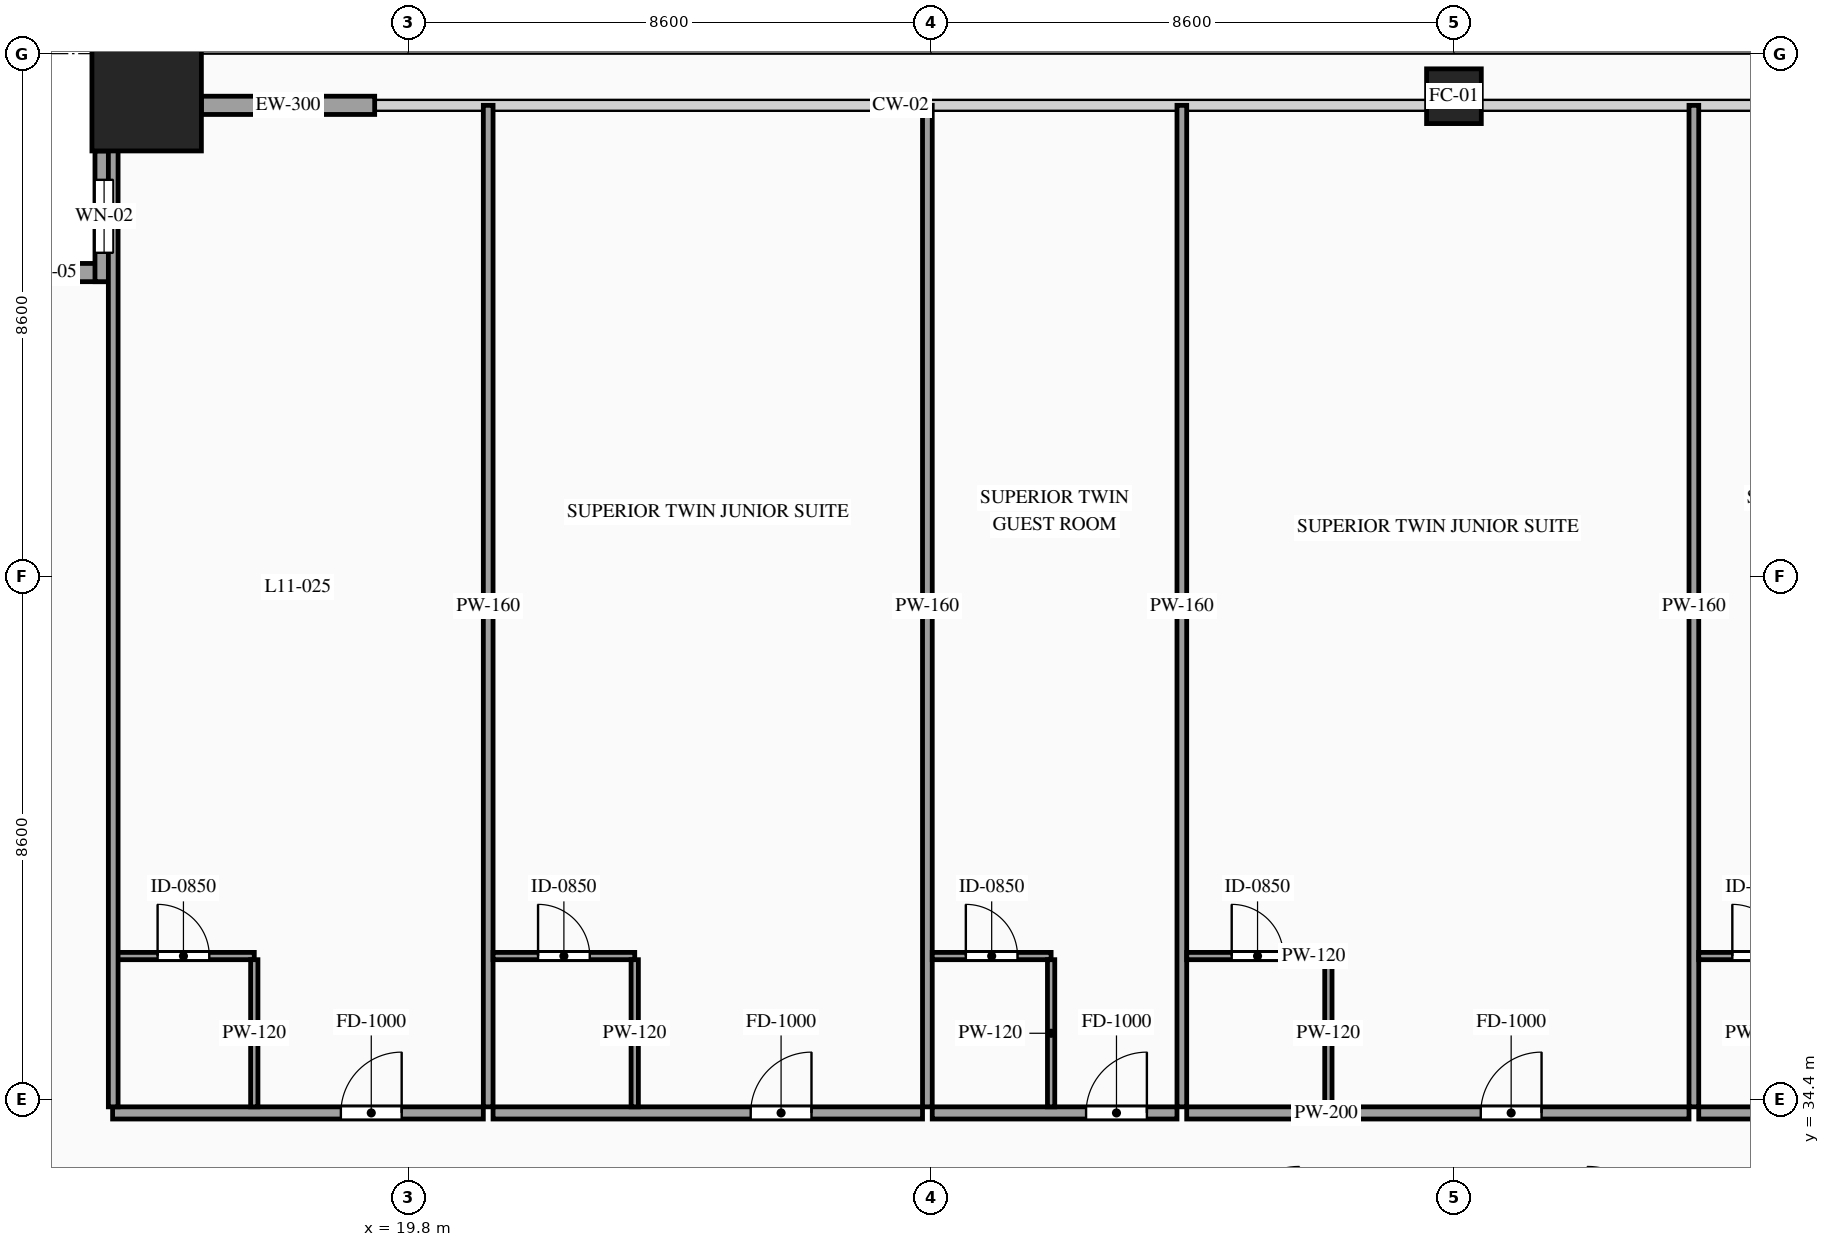
"""IFC4 building model, lengths in metres.
Left out: names, types, materials, properties, quantities, classifications, styles, units other than length and angle.
Written with IfcOpenShell. Run it as: python <this file> out.ifc"""

import sys

from ifc_helpers import new_model, si_unit, direction, frame, frame_2d, origin, origin_2d, place, context, subcontext, project, spatial, rectangle, hollow_rectangle, extrude, source, transform, mapped, element, fill, save


model = new_model("IFC4")
c1 = context("Model", 3, precision=1e-05, world=origin(), true_north=direction((0.0, 1.0)))
c2 = subcontext(c1, "Body", "Model", "MODEL_VIEW")
j1 = project(units=[si_unit("LENGTHUNIT", "METRE"), si_unit("PLANEANGLEUNIT", "RADIAN")], contexts=[c1])
p1 = place(None, origin())
s1 = spatial("IfcSite", under=j1, at=p1, CompositionType="ELEMENT")
p2 = place(p1, origin())
s2 = spatial("IfcBuilding", under=s1, at=p2, CompositionType="ELEMENT")
p3 = place(p2, frame((0.0, 0.0, 46.0)))
s3 = spatial("IfcBuildingStorey", under=s2, at=p3, CompositionType="ELEMENT", Elevation=46.0)
m1 = source(origin(), c2, "Body", "SweptSolid", [
    extrude(hollow_rectangle(XDim=1.8, YDim=1.8, WallThickness=0.08, at=origin_2d()), origin(), (0.0, 0.0, 1.0), 3.6),
])
p4 = place(p3, frame((15.5, 50.9, 0.0), z_axis=(0.0, 0.0, 1.0), x_axis=(1.0, 0.0, 0.0)))
e1 = element("IfcColumn", 1, at=p4, inside=s3, PredefinedType="COLUMN", context=c2, shape_type="MappedRepresentation", body=[
    mapped(m1, transform((0.0, 0.0, 0.0), scale=1.0)),
])
m2 = source(origin(), c2, "Body", "SweptSolid", [
    extrude(hollow_rectangle(XDim=0.9, YDim=0.9, WallThickness=0.042, at=origin_2d()), origin(), (0.0, 0.0, 1.0), 3.6),
])
p5 = place(p3, frame((37.0, 50.9, 0.0), z_axis=(0.0, 0.0, 1.0), x_axis=(1.0, 0.0, 0.0)))
e2 = element("IfcColumn", 2, at=p5, inside=s3, PredefinedType="COLUMN", context=c2, shape_type="MappedRepresentation", body=[
    mapped(m2, transform((0.0, 0.0, 0.0), scale=1.0)),
])
p6 = place(p3, frame((14.95, 48.0, 0.0), z_axis=(0.0, 0.0, 1.0), x_axis=(-1.0, 0.0, 0.0)))
e3 = element("IfcWall", 3, at=p6, inside=s3, PredefinedType="SOLIDWALL", context=c2, shape_type="SweptSolid", body=[
    extrude(rectangle(XDim=2.15, YDim=0.3, at=frame_2d((1.075, 0.0))), origin(), (0.0, 0.0, 1.0), 3.38),
])
p7 = place(p6, frame((0.625, 0.0, 0.85)))
e4 = element("IfcOpeningElement", 4, at=p7, cuts=e3, PredefinedType="OPENING", context=c2, shape_type="SweptSolid", body=[
    extrude(rectangle(XDim=0.9, YDim=1.5, at=frame_2d((0.45, 0.75))), frame((0.0, 0.165, 0.0), z_axis=(0.0, -1.0, 0.0), x_axis=(1.0, 0.0, 0.0)), (0.0, 0.0, 1.0), 0.33),
])
p8 = place(p3, frame((14.8, 50.0, 0.0), z_axis=(0.0, 0.0, 1.0), x_axis=(0.0, -1.0, 0.0)))
e5 = element("IfcWall", 5, at=p8, inside=s3, PredefinedType="SOLIDWALL", context=c2, shape_type="SweptSolid", body=[
    extrude(rectangle(XDim=2.15, YDim=0.3, at=frame_2d((1.075, 0.0))), origin(), (0.0, 0.0, 1.0), 3.38),
])
p9 = place(p8, frame((0.475, 0.0, 0.85)))
e6 = element("IfcOpeningElement", 6, at=p9, cuts=e5, PredefinedType="OPENING", context=c2, shape_type="SweptSolid", body=[
    extrude(rectangle(XDim=1.2, YDim=2.1, at=frame_2d((0.6, 1.05))), frame((0.0, 0.165, 0.0), z_axis=(0.0, -1.0, 0.0), x_axis=(1.0, 0.0, 0.0)), (0.0, 0.0, 1.0), 0.33),
])
m3 = source(origin(), c2, "Body", "SweptSolid", [
    extrude(rectangle(XDim=2.85, YDim=0.3, at=frame_2d((1.425, 0.0))), origin(), (0.0, 0.0, 1.0), 2.775),
])
p10 = place(p3, frame((16.4, 50.75, 0.0), z_axis=(0.0, 0.0, 1.0), x_axis=(1.0, 0.0, 0.0)))
e7 = element("IfcWall", 7, at=p10, inside=s3, PredefinedType="SOLIDWALL", context=c2, shape_type="MappedRepresentation", body=[
    mapped(m3, transform((0.0, 0.0, 0.0), scale=1.0)),
])
p11 = place(p3, frame((14.94, 34.18, 0.0), z_axis=(0.0, 0.0, 1.0), x_axis=(1.0, 0.0, 0.0)))
e8 = element("IfcWall", 8, at=p11, inside=s3, PredefinedType="PARTITIONING", context=c2, shape_type="SweptSolid", body=[
    extrude(rectangle(XDim=6.097, YDim=0.2, at=frame_2d((3.049, 0.0))), origin(), (0.0, 0.0, 1.0), 3.38),
])
p12 = place(p11, frame((3.754, 0.0, 0.0)))
e9 = element("IfcOpeningElement", 9, at=p12, cuts=e8, PredefinedType="OPENING", context=c2, shape_type="SweptSolid", body=[
    extrude(rectangle(XDim=1.0, YDim=2.2, at=frame_2d((0.5, 1.1))), frame((0.0, 0.115, 0.0), z_axis=(0.0, -1.0, 0.0), x_axis=(1.0, 0.0, 0.0)), (0.0, 0.0, 1.0), 0.23),
])
m4 = source(origin(), c2, "Body", "SweptSolid", [
    extrude(rectangle(XDim=16.47, YDim=0.16, at=frame_2d((8.235, 0.0))), origin(), (0.0, 0.0, 1.0), 3.38),
])
p13 = place(p3, frame((21.117, 34.28, 0.0), z_axis=(0.0, 0.0, 1.0), x_axis=(0.0, 1.0, 0.0)))
e10 = element("IfcWall", 10, at=p13, inside=s3, PredefinedType="PARTITIONING", context=c2, shape_type="MappedRepresentation", body=[
    mapped(m4, transform((0.0, 0.0, 0.0), scale=1.0)),
])
p14 = place(p3, frame((14.94, 36.76, 0.0), z_axis=(0.0, 0.0, 1.0), x_axis=(1.0, 0.0, 0.0)))
e11 = element("IfcWall", 11, at=p14, inside=s3, PredefinedType="PARTITIONING", context=c2, shape_type="SweptSolid", body=[
    extrude(rectangle(XDim=2.33, YDim=0.12, at=frame_2d((1.165, 0.0))), origin(), (0.0, 0.0, 1.0), 3.38),
])
p15 = place(p14, frame((0.74, 0.0, 0.0)))
e12 = element("IfcOpeningElement", 12, at=p15, cuts=e11, PredefinedType="OPENING", context=c2, shape_type="SweptSolid", body=[
    extrude(rectangle(XDim=0.85, YDim=2.1, at=frame_2d((0.425, 1.05))), frame((0.0, 0.075, 0.0), z_axis=(0.0, -1.0, 0.0), x_axis=(1.0, 0.0, 0.0)), (0.0, 0.0, 1.0), 0.15),
])
m5 = source(origin(), c2, "Body", "SweptSolid", [
    extrude(rectangle(XDim=2.42, YDim=0.12, at=frame_2d((1.21, 0.0))), origin(), (0.0, 0.0, 1.0), 3.38),
])
p16 = place(p3, frame((17.27, 34.28, 0.0), z_axis=(0.0, 0.0, 1.0), x_axis=(0.0, 1.0, 0.0)))
e13 = element("IfcWall", 13, at=p16, inside=s3, PredefinedType="PARTITIONING", context=c2, shape_type="MappedRepresentation", body=[
    mapped(m5, transform((0.0, 0.0, 0.0), scale=1.0)),
])
p17 = place(p3, frame((21.197, 34.18, 0.0), z_axis=(0.0, 0.0, 1.0), x_axis=(1.0, 0.0, 0.0)))
e14 = element("IfcWall", 14, at=p17, inside=s3, PredefinedType="PARTITIONING", context=c2, shape_type="SweptSolid", body=[
    extrude(rectangle(XDim=7.063, YDim=0.2, at=frame_2d((3.531, 0.0))), origin(), (0.0, 0.0, 1.0), 3.38),
])
p18 = place(p17, frame((4.237, 0.0, 0.0)))
e15 = element("IfcOpeningElement", 15, at=p18, cuts=e14, PredefinedType="OPENING", context=c2, shape_type="SweptSolid", body=[
    extrude(rectangle(XDim=1.0, YDim=2.2, at=frame_2d((0.5, 1.1))), frame((0.0, 0.115, 0.0), z_axis=(0.0, -1.0, 0.0), x_axis=(1.0, 0.0, 0.0)), (0.0, 0.0, 1.0), 0.23),
])
p19 = place(p3, frame((28.34, 34.28, 0.0), z_axis=(0.0, 0.0, 1.0), x_axis=(0.0, 1.0, 0.0)))
e16 = element("IfcWall", 16, at=p19, inside=s3, PredefinedType="PARTITIONING", context=c2, shape_type="MappedRepresentation", body=[
    mapped(m4, transform((0.0, 0.0, 0.0), scale=1.0)),
])
p20 = place(p3, frame((21.197, 36.76, 0.0), z_axis=(0.0, 0.0, 1.0), x_axis=(1.0, 0.0, 0.0)))
e17 = element("IfcWall", 17, at=p20, inside=s3, PredefinedType="PARTITIONING", context=c2, shape_type="SweptSolid", body=[
    extrude(rectangle(XDim=2.33, YDim=0.12, at=frame_2d((1.165, 0.0))), origin(), (0.0, 0.0, 1.0), 3.38),
])
p21 = place(p20, frame((0.74, 0.0, 0.0)))
e18 = element("IfcOpeningElement", 18, at=p21, cuts=e17, PredefinedType="OPENING", context=c2, shape_type="SweptSolid", body=[
    extrude(rectangle(XDim=0.85, YDim=2.1, at=frame_2d((0.425, 1.05))), frame((0.0, 0.075, 0.0), z_axis=(0.0, -1.0, 0.0), x_axis=(1.0, 0.0, 0.0)), (0.0, 0.0, 1.0), 0.15),
])
p22 = place(p3, frame((23.527, 34.28, 0.0), z_axis=(0.0, 0.0, 1.0), x_axis=(0.0, 1.0, 0.0)))
e19 = element("IfcWall", 19, at=p22, inside=s3, PredefinedType="PARTITIONING", context=c2, shape_type="MappedRepresentation", body=[
    mapped(m5, transform((0.0, 0.0, 0.0), scale=1.0)),
])
p23 = place(p3, frame((28.42, 34.18, 0.0), z_axis=(0.0, 0.0, 1.0), x_axis=(1.0, 0.0, 0.0)))
e20 = element("IfcWall", 20, at=p23, inside=s3, PredefinedType="PARTITIONING", context=c2, shape_type="SweptSolid", body=[
    extrude(rectangle(XDim=4.025, YDim=0.2, at=frame_2d((2.013, 0.0))), origin(), (0.0, 0.0, 1.0), 3.38),
])
p24 = place(p23, frame((2.53, 0.0, 0.0)))
e21 = element("IfcOpeningElement", 21, at=p24, cuts=e20, PredefinedType="OPENING", context=c2, shape_type="SweptSolid", body=[
    extrude(rectangle(XDim=1.0, YDim=2.2, at=frame_2d((0.5, 1.1))), frame((0.0, 0.115, 0.0), z_axis=(0.0, -1.0, 0.0), x_axis=(1.0, 0.0, 0.0)), (0.0, 0.0, 1.0), 0.23),
])
p25 = place(p3, frame((32.525, 34.28, 0.0), z_axis=(0.0, 0.0, 1.0), x_axis=(0.0, 1.0, 0.0)))
e22 = element("IfcWall", 22, at=p25, inside=s3, PredefinedType="PARTITIONING", context=c2, shape_type="MappedRepresentation", body=[
    mapped(m4, transform((0.0, 0.0, 0.0), scale=1.0)),
])
p26 = place(p3, frame((28.42, 36.76, 0.0), z_axis=(0.0, 0.0, 1.0), x_axis=(1.0, 0.0, 0.0)))
e23 = element("IfcWall", 23, at=p26, inside=s3, PredefinedType="PARTITIONING", context=c2, shape_type="SweptSolid", body=[
    extrude(rectangle(XDim=1.955, YDim=0.12, at=frame_2d((0.978, 0.0))), origin(), (0.0, 0.0, 1.0), 3.38),
])
p27 = place(p26, frame((0.552, 0.0, 0.0)))
e24 = element("IfcOpeningElement", 24, at=p27, cuts=e23, PredefinedType="OPENING", context=c2, shape_type="SweptSolid", body=[
    extrude(rectangle(XDim=0.85, YDim=2.1, at=frame_2d((0.425, 1.05))), frame((0.0, 0.075, 0.0), z_axis=(0.0, -1.0, 0.0), x_axis=(1.0, 0.0, 0.0)), (0.0, 0.0, 1.0), 0.15),
])
p28 = place(p3, frame((30.375, 34.28, 0.0), z_axis=(0.0, 0.0, 1.0), x_axis=(0.0, 1.0, 0.0)))
e25 = element("IfcWall", 25, at=p28, inside=s3, PredefinedType="PARTITIONING", context=c2, shape_type="MappedRepresentation", body=[
    mapped(m5, transform((0.0, 0.0, 0.0), scale=1.0)),
])
p29 = place(p3, frame((32.605, 34.18, 0.0), z_axis=(0.0, 0.0, 1.0), x_axis=(1.0, 0.0, 0.0)))
e26 = element("IfcWall", 26, at=p29, inside=s3, PredefinedType="PARTITIONING", context=c2, shape_type="SweptSolid", body=[
    extrude(rectangle(XDim=8.261, YDim=0.2, at=frame_2d((4.13, 0.0))), origin(), (0.0, 0.0, 1.0), 3.38),
])
p30 = place(p29, frame((4.836, 0.0, 0.0)))
e27 = element("IfcOpeningElement", 27, at=p30, cuts=e26, PredefinedType="OPENING", context=c2, shape_type="SweptSolid", body=[
    extrude(rectangle(XDim=1.0, YDim=2.2, at=frame_2d((0.5, 1.1))), frame((0.0, 0.115, 0.0), z_axis=(0.0, -1.0, 0.0), x_axis=(1.0, 0.0, 0.0)), (0.0, 0.0, 1.0), 0.23),
])
p31 = place(p3, frame((40.946, 34.28, 0.0), z_axis=(0.0, 0.0, 1.0), x_axis=(0.0, 1.0, 0.0)))
e28 = element("IfcWall", 28, at=p31, inside=s3, PredefinedType="PARTITIONING", context=c2, shape_type="MappedRepresentation", body=[
    mapped(m4, transform((0.0, 0.0, 0.0), scale=1.0)),
])
p32 = place(p3, frame((32.605, 36.76, 0.0), z_axis=(0.0, 0.0, 1.0), x_axis=(1.0, 0.0, 0.0)))
e29 = element("IfcWall", 29, at=p32, inside=s3, PredefinedType="PARTITIONING", context=c2, shape_type="SweptSolid", body=[
    extrude(rectangle(XDim=2.33, YDim=0.12, at=frame_2d((1.165, 0.0))), origin(), (0.0, 0.0, 1.0), 3.38),
])
p33 = place(p32, frame((0.74, 0.0, 0.0)))
e30 = element("IfcOpeningElement", 30, at=p33, cuts=e29, PredefinedType="OPENING", context=c2, shape_type="SweptSolid", body=[
    extrude(rectangle(XDim=0.85, YDim=2.1, at=frame_2d((0.425, 1.05))), frame((0.0, 0.075, 0.0), z_axis=(0.0, -1.0, 0.0), x_axis=(1.0, 0.0, 0.0)), (0.0, 0.0, 1.0), 0.15),
])
p34 = place(p3, frame((34.935, 34.28, 0.0), z_axis=(0.0, 0.0, 1.0), x_axis=(0.0, 1.0, 0.0)))
e31 = element("IfcWall", 31, at=p34, inside=s3, PredefinedType="PARTITIONING", context=c2, shape_type="MappedRepresentation", body=[
    mapped(m5, transform((0.0, 0.0, 0.0), scale=1.0)),
])
p35 = place(p3, frame((41.026, 34.18, 0.0), z_axis=(0.0, 0.0, 1.0), x_axis=(1.0, 0.0, 0.0)))
e32 = element("IfcWall", 32, at=p35, inside=s3, PredefinedType="PARTITIONING", context=c2, shape_type="SweptSolid", body=[
    extrude(rectangle(XDim=4.025, YDim=0.2, at=frame_2d((2.013, 0.0))), origin(), (0.0, 0.0, 1.0), 3.38),
])
p36 = place(p35, frame((2.53, 0.0, 0.0)))
e33 = element("IfcOpeningElement", 33, at=p36, cuts=e32, PredefinedType="OPENING", context=c2, shape_type="SweptSolid", body=[
    extrude(rectangle(XDim=1.0, YDim=2.2, at=frame_2d((0.5, 1.1))), frame((0.0, 0.115, 0.0), z_axis=(0.0, -1.0, 0.0), x_axis=(1.0, 0.0, 0.0)), (0.0, 0.0, 1.0), 0.23),
])
p37 = place(p3, frame((41.026, 36.76, 0.0), z_axis=(0.0, 0.0, 1.0), x_axis=(1.0, 0.0, 0.0)))
e34 = element("IfcWall", 34, at=p37, inside=s3, PredefinedType="PARTITIONING", context=c2, shape_type="SweptSolid", body=[
    extrude(rectangle(XDim=1.955, YDim=0.12, at=frame_2d((0.978, 0.0))), origin(), (0.0, 0.0, 1.0), 3.38),
])
p38 = place(p37, frame((0.552, 0.0, 0.0)))
e35 = element("IfcOpeningElement", 35, at=p38, cuts=e34, PredefinedType="OPENING", context=c2, shape_type="SweptSolid", body=[
    extrude(rectangle(XDim=0.85, YDim=2.1, at=frame_2d((0.425, 1.05))), frame((0.0, 0.075, 0.0), z_axis=(0.0, -1.0, 0.0), x_axis=(1.0, 0.0, 0.0)), (0.0, 0.0, 1.0), 0.15),
])
m6 = source(origin(), c2, "Body", "SweptSolid", [
    extrude(rectangle(XDim=16.32, YDim=0.16, at=frame_2d((8.16, 0.0))), origin(), (0.0, 0.0, 1.0), 3.38),
])
p39 = place(p3, frame((14.95, 34.28, 0.0), z_axis=(0.0, 0.0, 1.0), x_axis=(0.0, 1.0, 0.0)))
e36 = element("IfcWall", 36, at=p39, inside=s3, PredefinedType="PARTITIONING", context=c2, shape_type="MappedRepresentation", body=[
    mapped(m6, transform((0.0, 0.0, 0.0), scale=1.0)),
])
m7 = source(origin(), c2, "Body", "SweptSolid", [
    extrude(rectangle(XDim=0.9, YDim=1.5, at=frame_2d((0.45, 0.75))), frame((0.0, 0.03, 0.0), z_axis=(0.0, -1.0, 0.0), x_axis=(1.0, 0.0, 0.0)), (0.0, 0.0, 1.0), 0.06),
])
p40 = place(p7, origin())
e37 = element("IfcWindow", 37, at=p40, inside=s3, PartitioningType="SINGLE_PANEL", PredefinedType="WINDOW", context=c2, shape_type="MappedRepresentation", body=[
    mapped(m7, transform((0.0, 0.0, 0.0), scale=1.0)),
])
fill(e4, e37)
m8 = source(origin(), c2, "Body", "SweptSolid", [
    extrude(rectangle(XDim=1.2, YDim=2.1, at=frame_2d((0.6, 1.05))), frame((0.0, 0.03, 0.0), z_axis=(0.0, -1.0, 0.0), x_axis=(1.0, 0.0, 0.0)), (0.0, 0.0, 1.0), 0.06),
])
p41 = place(p9, origin())
e38 = element("IfcWindow", 38, at=p41, inside=s3, PartitioningType="SINGLE_PANEL", PredefinedType="WINDOW", context=c2, shape_type="MappedRepresentation", body=[
    mapped(m8, transform((0.0, 0.0, 0.0), scale=1.0)),
])
fill(e6, e38)
m9 = source(origin(), c2, "Body", "SweptSolid", [
    extrude(rectangle(XDim=1.0, YDim=2.2, at=frame_2d((0.5, 1.1))), frame((0.0, 0.025, 0.0), z_axis=(0.0, -1.0, 0.0), x_axis=(1.0, 0.0, 0.0)), (0.0, 0.0, 1.0), 0.05),
])
p42 = place(p12, origin())
e39 = element("IfcDoor", 39, at=p42, inside=s3, OperationType="SINGLE_SWING_RIGHT", PredefinedType="DOOR", context=c2, shape_type="MappedRepresentation", body=[
    mapped(m9, transform((0.0, 0.0, 0.0), scale=1.0)),
])
fill(e9, e39)
m10 = source(origin(), c2, "Body", "SweptSolid", [
    extrude(rectangle(XDim=0.85, YDim=2.1, at=frame_2d((0.425, 1.05))), frame((0.0, 0.025, 0.0), z_axis=(0.0, -1.0, 0.0), x_axis=(1.0, 0.0, 0.0)), (0.0, 0.0, 1.0), 0.05),
])
p43 = place(p15, origin())
e40 = element("IfcDoor", 40, at=p43, inside=s3, OperationType="SINGLE_SWING_LEFT", PredefinedType="DOOR", context=c2, shape_type="MappedRepresentation", body=[
    mapped(m10, transform((0.0, 0.0, 0.0), scale=1.0)),
])
fill(e12, e40)
p44 = place(p18, origin())
e41 = element("IfcDoor", 41, at=p44, inside=s3, OperationType="SINGLE_SWING_RIGHT", PredefinedType="DOOR", context=c2, shape_type="MappedRepresentation", body=[
    mapped(m9, transform((0.0, 0.0, 0.0), scale=1.0)),
])
fill(e15, e41)
p45 = place(p21, origin())
e42 = element("IfcDoor", 42, at=p45, inside=s3, OperationType="SINGLE_SWING_LEFT", PredefinedType="DOOR", context=c2, shape_type="MappedRepresentation", body=[
    mapped(m10, transform((0.0, 0.0, 0.0), scale=1.0)),
])
fill(e18, e42)
p46 = place(p24, origin())
e43 = element("IfcDoor", 43, at=p46, inside=s3, OperationType="SINGLE_SWING_RIGHT", PredefinedType="DOOR", context=c2, shape_type="MappedRepresentation", body=[
    mapped(m9, transform((0.0, 0.0, 0.0), scale=1.0)),
])
fill(e21, e43)
p47 = place(p27, origin())
e44 = element("IfcDoor", 44, at=p47, inside=s3, OperationType="SINGLE_SWING_LEFT", PredefinedType="DOOR", context=c2, shape_type="MappedRepresentation", body=[
    mapped(m10, transform((0.0, 0.0, 0.0), scale=1.0)),
])
fill(e24, e44)
p48 = place(p30, origin())
e45 = element("IfcDoor", 45, at=p48, inside=s3, OperationType="SINGLE_SWING_RIGHT", PredefinedType="DOOR", context=c2, shape_type="MappedRepresentation", body=[
    mapped(m9, transform((0.0, 0.0, 0.0), scale=1.0)),
])
fill(e27, e45)
p49 = place(p33, origin())
e46 = element("IfcDoor", 46, at=p49, inside=s3, OperationType="SINGLE_SWING_LEFT", PredefinedType="DOOR", context=c2, shape_type="MappedRepresentation", body=[
    mapped(m10, transform((0.0, 0.0, 0.0), scale=1.0)),
])
fill(e30, e46)
p50 = place(p38, origin())
e47 = element("IfcDoor", 47, at=p50, inside=s3, OperationType="SINGLE_SWING_LEFT", PredefinedType="DOOR", context=c2, shape_type="MappedRepresentation", body=[
    mapped(m10, transform((0.0, 0.0, 0.0), scale=1.0)),
])
fill(e35, e47)
save(model, sys.argv[1])
